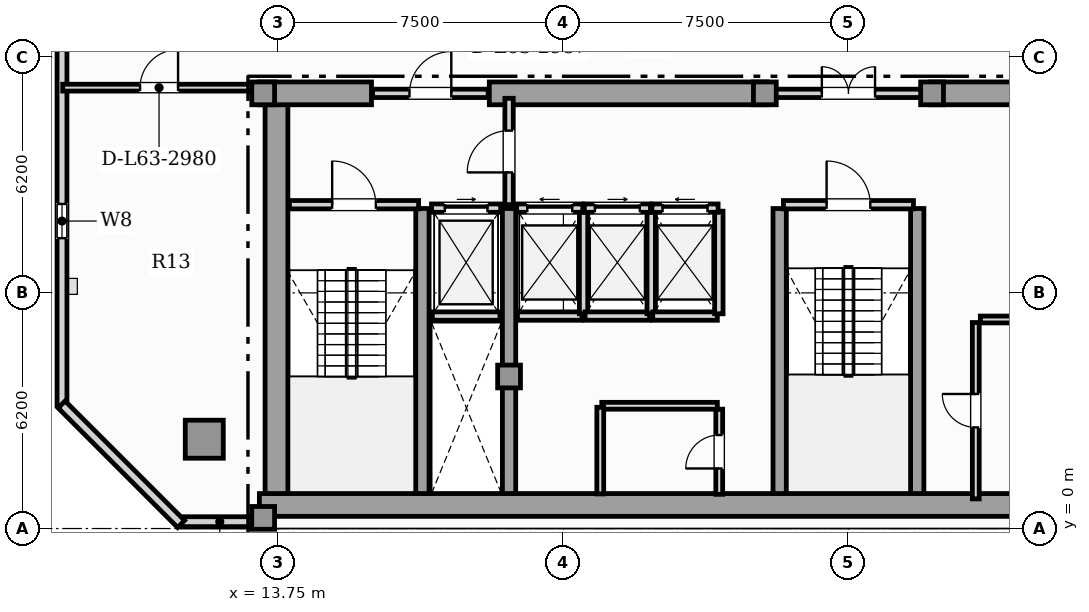
"""IFC4 building model, lengths in metres.
Left out: names, types, materials, properties, quantities, classifications, styles, units other than length and angle.
Written with IfcOpenShell. Run it as: python <this file> out.ifc"""

import sys

from ifc_helpers import new_model, si_unit, direction, frame, frame_2d, origin, origin_2d, place, context, subcontext, project, spatial, rectangle, hollow_rectangle, extrude, element, fill, save


model = new_model("IFC4")
c1 = context("Model", 3, precision=1e-05, world=origin(), true_north=direction((0.0, 1.0)))
c2 = subcontext(c1, "Body", "Model", "MODEL_VIEW")
j1 = project(units=[si_unit("LENGTHUNIT", "METRE"), si_unit("PLANEANGLEUNIT", "RADIAN")], contexts=[c1])
p1 = place(None, origin())
s1 = spatial("IfcSite", under=j1, at=p1, CompositionType="ELEMENT")
p2 = place(p1, origin())
s2 = spatial("IfcBuilding", under=s1, at=p2, CompositionType="ELEMENT")
p3 = place(p2, frame((0.0, 0.0, 256.75)))
s3 = spatial("IfcBuildingStorey", under=s2, at=p3, CompositionType="ELEMENT", Elevation=256.75)
p4 = place(p3, frame((13.25, 0.62, 0.0), z_axis=(0.0, 0.0, 1.0), x_axis=(1.0, 0.0, 0.0)))
e1 = element("IfcWall", 1, at=p4, inside=s3, PredefinedType="SHEAR", context=c2, shape_type="SweptSolid", body=[
    extrude(rectangle(XDim=31.0, YDim=0.6, at=frame_2d((15.5, 0.0))), origin(), (0.0, 0.0, 1.0), 3.65),
])
p5 = place(p3, frame((13.7, 0.92, 0.0), z_axis=(0.0, 0.0, 1.0), x_axis=(0.0, 1.0, 0.0)))
e2 = element("IfcWall", 2, at=p5, inside=s3, PredefinedType="SHEAR", context=c2, shape_type="SweptSolid", body=[
    extrude(rectangle(XDim=10.53, YDim=0.6, at=frame_2d((5.265, 0.0))), origin(), (0.0, 0.0, 1.0), 3.65),
])
p6 = place(p3, frame((13.25, 11.45, 0.0), z_axis=(0.0, 0.0, 1.0), x_axis=(1.0, 0.0, 0.0)))
e3 = element("IfcWall", 3, at=p6, inside=s3, PredefinedType="SHEAR", context=c2, shape_type="SweptSolid", body=[
    extrude(rectangle(XDim=2.95, YDim=0.6, at=frame_2d((1.475, 0.0))), origin(), (0.0, 0.0, 1.0), 3.65),
])
for number, where, z_axis, x_axis in (
    (4, (19.3, 11.45, 0.0), (0.0, 0.0, 1.0), (1.0, 0.0, 0.0)),
    (5, (30.9, 11.45, 0.0), (0.0, 0.0, 1.0), (1.0, 0.0, 0.0)),
):
    element("IfcWall", number, at=place(p3, frame(where, z_axis=z_axis, x_axis=x_axis)), inside=s3, PredefinedType="SHEAR", context=c2, shape_type="SweptSolid", body=[
        extrude(rectangle(XDim=7.3, YDim=0.6, at=frame_2d((3.65, 0.0))), origin(), (0.0, 0.0, 1.0), 3.65),
    ])
for number, where, z_axis, x_axis in (
    (6, (17.54, 0.92, 0.0), (0.0, 0.0, 1.0), (0.0, 1.0, 0.0)),
    (7, (19.82, 0.92, 0.0), (0.0, 0.0, 1.0), (0.0, 1.0, 0.0)),
    (8, (26.94, 0.92, 0.0), (0.0, 0.0, 1.0), (0.0, 1.0, 0.0)),
    (9, (30.56, 0.92, 0.0), (0.0, 0.0, 1.0), (0.0, 1.0, 0.0)),
):
    element("IfcWall", number, at=place(p3, frame(where, z_axis=z_axis, x_axis=x_axis)), inside=s3, PredefinedType="SHEAR", context=c2, shape_type="SweptSolid", body=[
        extrude(rectangle(XDim=7.5, YDim=0.35, at=frame_2d((3.75, 0.0))), origin(), (0.0, 0.0, 1.0), 3.65),
    ])
for number, where, z_axis, x_axis in (
    (10, (13.35, 0.28, 0.0), (0.0, 0.0, 1.0), (1.0, 0.0, 0.0)),
    (11, (13.35, 11.45, 0.0), (0.0, 0.0, 1.0), (1.0, 0.0, 0.0)),
    (12, (19.82, 4.0, 0.0), (0.0, 0.0, 1.0), (1.0, 0.0, 0.0)),
    (13, (26.55, 11.45, 0.0), (0.0, 0.0, 1.0), (1.0, 0.0, 0.0)),
    (14, (30.95, 11.45, 0.0), (0.0, 0.0, 1.0), (1.0, 0.0, 0.0)),
):
    element("IfcColumn", number, at=place(p3, frame(where, z_axis=z_axis, x_axis=x_axis)), inside=s3, PredefinedType="COLUMN", context=c2, shape_type="SweptSolid", body=[
        extrude(rectangle(XDim=0.6, YDim=0.6, at=origin_2d()), origin(), (0.0, 0.0, 1.0), 3.85),
    ])
p7 = place(p3, frame((11.8, 2.35, 0.0), z_axis=(0.0, 0.0, 1.0), x_axis=(1.0, 0.0, 0.0)))
e15 = element("IfcColumn", 15, at=p7, inside=s3, PredefinedType="USERDEFINED", context=c2, shape_type="SweptSolid", body=[
    extrude(hollow_rectangle(XDim=1.0, YDim=1.0, WallThickness=0.06, at=origin_2d()), origin(), (0.0, 0.0, 1.0), 3.85),
])
p8 = place(p3, frame((11.167, 0.18, 0.0), z_axis=(0.0, 0.0, 1.0), x_axis=(1.0, 0.0, 0.0)))
e16 = element("IfcWall", 16, at=p8, inside=s3, PredefinedType="SOLIDWALL", context=c2, shape_type="SweptSolid", body=[
    extrude(rectangle(XDim=2.083, YDim=0.26, at=frame_2d((1.042, 0.0))), origin(), (0.0, 0.0, 1.0), 3.65),
])
p9 = place(p3, frame((8.057, 32.726, 0.0), z_axis=(0.0, 0.0, 1.0), x_axis=(0.0, -1.0, 0.0)))
e17 = element("IfcWall", 17, at=p9, inside=s3, PredefinedType="SOLIDWALL", context=c2, shape_type="SweptSolid", body=[
    extrude(rectangle(XDim=29.486, YDim=0.26, at=frame_2d((14.743, 0.0))), origin(), (0.0, 0.0, 1.0), 3.19),
])
p10 = place(p9, frame((24.186, 0.0, 0.85)))
e18 = element("IfcOpeningElement", 18, at=p10, cuts=e17, PredefinedType="OPENING", context=c2, shape_type="SweptSolid", body=[
    extrude(rectangle(XDim=0.9, YDim=1.4, at=frame_2d((0.45, 0.7))), frame((0.0, 0.14, 0.0), z_axis=(0.0, -1.0, 0.0), x_axis=(1.0, 0.0, 0.0)), (0.0, 0.0, 1.0), 0.28),
])
p11 = place(p9, frame((4.526, 0.0, 0.85)))
e19 = element("IfcOpeningElement", 19, at=p11, cuts=e17, PredefinedType="OPENING", context=c2, shape_type="SweptSolid", body=[
    extrude(rectangle(XDim=0.9, YDim=1.4, at=frame_2d((0.45, 0.7))), frame((0.0, 0.14, 0.0), z_axis=(0.0, -1.0, 0.0), x_axis=(1.0, 0.0, 0.0)), (0.0, 0.0, 1.0), 0.28),
])
p12 = place(p9, frame((15.108, 0.0, 0.85)))
e20 = element("IfcOpeningElement", 20, at=p12, cuts=e17, PredefinedType="OPENING", context=c2, shape_type="SweptSolid", body=[
    extrude(rectangle(XDim=0.9, YDim=1.4, at=frame_2d((0.45, 0.7))), frame((0.0, 0.14, 0.0), z_axis=(0.0, -1.0, 0.0), x_axis=(1.0, 0.0, 0.0)), (0.0, 0.0, 1.0), 0.28),
])
p13 = place(p9, frame((9.501, 0.0, 0.85)))
e21 = element("IfcOpeningElement", 21, at=p13, cuts=e17, PredefinedType="OPENING", context=c2, shape_type="SweptSolid", body=[
    extrude(rectangle(XDim=0.9, YDim=1.4, at=frame_2d((0.45, 0.7))), frame((0.0, 0.14, 0.0), z_axis=(0.0, -1.0, 0.0), x_axis=(1.0, 0.0, 0.0)), (0.0, 0.0, 1.0), 0.28),
])
p14 = place(p3, frame((8.047, 3.264, 0.0), z_axis=(0.0, 0.0, 1.0), x_axis=(0.707079321262, -0.707134240044, 0.0)))
e22 = element("IfcWall", 22, at=p14, inside=s3, PredefinedType="SOLIDWALL", context=c2, shape_type="SweptSolid", body=[
    extrude(rectangle(XDim=4.446, YDim=0.26, at=frame_2d((2.223, 0.0))), origin(), (0.0, 0.0, 1.0), 3.65),
])
p15 = place(p3, frame((17.8, 5.59, 0.0), z_axis=(0.0, 0.0, 1.0), x_axis=(1.0, 0.0, 0.0)))
e23 = element("IfcWall", 23, at=p15, inside=s3, PredefinedType="SOLIDWALL", context=c2, shape_type="SweptSolid", body=[
    extrude(rectangle(XDim=1.78, YDim=0.22, at=frame_2d((0.89, 0.0))), origin(), (0.0, 0.0, 1.0), 3.65),
])
p16 = place(p3, frame((17.78, 8.43, 0.0), z_axis=(0.0, 0.0, 1.0), x_axis=(1.0, 0.0, 0.0)))
e24 = element("IfcWall", 24, at=p16, inside=s3, PredefinedType="SOLIDWALL", context=c2, shape_type="SweptSolid", body=[
    extrude(rectangle(XDim=1.82, YDim=0.22, at=frame_2d((0.91, 0.0))), origin(), (0.0, 0.0, 1.0), 3.65),
])
p17 = place(p16, frame((0.35, 0.0, 0.0)))
e25 = element("IfcOpeningElement", 25, at=p17, cuts=e24, PredefinedType="OPENING", context=c2, shape_type="SweptSolid", body=[
    extrude(rectangle(XDim=1.12, YDim=2.25, at=frame_2d((0.56, 1.125))), frame((0.0, 0.12, 0.0), z_axis=(0.0, -1.0, 0.0), x_axis=(1.0, 0.0, 0.0)), (0.0, 0.0, 1.0), 0.24),
])
p18 = place(p3, frame((20.04, 5.59, 0.0), z_axis=(0.0, 0.0, 1.0), x_axis=(1.0, 0.0, 0.0)))
e26 = element("IfcWall", 26, at=p18, inside=s3, PredefinedType="SOLIDWALL", context=c2, shape_type="SweptSolid", body=[
    extrude(rectangle(XDim=1.7, YDim=0.22, at=frame_2d((0.85, 0.0))), origin(), (0.0, 0.0, 1.0), 3.65),
])
p19 = place(p3, frame((21.78, 5.65, 0.0), z_axis=(0.0, 0.0, 1.0), x_axis=(0.0, 1.0, 0.0)))
e27 = element("IfcWall", 27, at=p19, inside=s3, PredefinedType="SOLIDWALL", context=c2, shape_type="SweptSolid", body=[
    extrude(rectangle(XDim=2.7, YDim=0.22, at=frame_2d((1.35, 0.0))), origin(), (0.0, 0.0, 1.0), 3.65),
])
p20 = place(p3, frame((20.02, 8.43, 0.0), z_axis=(0.0, 0.0, 1.0), x_axis=(1.0, 0.0, 0.0)))
e28 = element("IfcWall", 28, at=p20, inside=s3, PredefinedType="SOLIDWALL", context=c2, shape_type="SweptSolid", body=[
    extrude(rectangle(XDim=1.74, YDim=0.22, at=frame_2d((0.87, 0.0))), origin(), (0.0, 0.0, 1.0), 3.65),
])
p21 = place(p20, frame((0.28, 0.0, 0.0)))
e29 = element("IfcOpeningElement", 29, at=p21, cuts=e28, PredefinedType="OPENING", context=c2, shape_type="SweptSolid", body=[
    extrude(rectangle(XDim=1.18, YDim=2.2, at=frame_2d((0.59, 1.1))), frame((0.0, 0.12, 0.0), z_axis=(0.0, -1.0, 0.0), x_axis=(1.0, 0.0, 0.0)), (0.0, 0.0, 1.0), 0.24),
])
p22 = place(p3, frame((21.82, 5.59, 0.0), z_axis=(0.0, 0.0, 1.0), x_axis=(1.0, 0.0, 0.0)))
e30 = element("IfcWall", 30, at=p22, inside=s3, PredefinedType="SOLIDWALL", context=c2, shape_type="SweptSolid", body=[
    extrude(rectangle(XDim=1.7, YDim=0.22, at=frame_2d((0.85, 0.0))), origin(), (0.0, 0.0, 1.0), 3.65),
])
p23 = place(p3, frame((23.56, 5.65, 0.0), z_axis=(0.0, 0.0, 1.0), x_axis=(0.0, 1.0, 0.0)))
e31 = element("IfcWall", 31, at=p23, inside=s3, PredefinedType="SOLIDWALL", context=c2, shape_type="SweptSolid", body=[
    extrude(rectangle(XDim=2.7, YDim=0.22, at=frame_2d((1.35, 0.0))), origin(), (0.0, 0.0, 1.0), 3.65),
])
p24 = place(p3, frame((21.8, 8.43, 0.0), z_axis=(0.0, 0.0, 1.0), x_axis=(1.0, 0.0, 0.0)))
e32 = element("IfcWall", 32, at=p24, inside=s3, PredefinedType="SOLIDWALL", context=c2, shape_type="SweptSolid", body=[
    extrude(rectangle(XDim=1.74, YDim=0.22, at=frame_2d((0.87, 0.0))), origin(), (0.0, 0.0, 1.0), 3.65),
])
p25 = place(p24, frame((0.28, 0.0, 0.0)))
e33 = element("IfcOpeningElement", 33, at=p25, cuts=e32, PredefinedType="OPENING", context=c2, shape_type="SweptSolid", body=[
    extrude(rectangle(XDim=1.18, YDim=2.2, at=frame_2d((0.59, 1.1))), frame((0.0, 0.12, 0.0), z_axis=(0.0, -1.0, 0.0), x_axis=(1.0, 0.0, 0.0)), (0.0, 0.0, 1.0), 0.24),
])
p26 = place(p3, frame((23.6, 5.59, 0.0), z_axis=(0.0, 0.0, 1.0), x_axis=(1.0, 0.0, 0.0)))
e34 = element("IfcWall", 34, at=p26, inside=s3, PredefinedType="SOLIDWALL", context=c2, shape_type="SweptSolid", body=[
    extrude(rectangle(XDim=1.7, YDim=0.22, at=frame_2d((0.85, 0.0))), origin(), (0.0, 0.0, 1.0), 3.65),
])
p27 = place(p3, frame((25.34, 5.65, 0.0), z_axis=(0.0, 0.0, 1.0), x_axis=(0.0, 1.0, 0.0)))
e35 = element("IfcWall", 35, at=p27, inside=s3, PredefinedType="SOLIDWALL", context=c2, shape_type="SweptSolid", body=[
    extrude(rectangle(XDim=2.7, YDim=0.22, at=frame_2d((1.35, 0.0))), origin(), (0.0, 0.0, 1.0), 3.65),
])
p28 = place(p3, frame((23.58, 8.43, 0.0), z_axis=(0.0, 0.0, 1.0), x_axis=(1.0, 0.0, 0.0)))
e36 = element("IfcWall", 36, at=p28, inside=s3, PredefinedType="SOLIDWALL", context=c2, shape_type="SweptSolid", body=[
    extrude(rectangle(XDim=1.74, YDim=0.22, at=frame_2d((0.87, 0.0))), origin(), (0.0, 0.0, 1.0), 3.65),
])
p29 = place(p28, frame((0.28, 0.0, 0.0)))
e37 = element("IfcOpeningElement", 37, at=p29, cuts=e36, PredefinedType="OPENING", context=c2, shape_type="SweptSolid", body=[
    extrude(rectangle(XDim=1.18, YDim=2.2, at=frame_2d((0.59, 1.1))), frame((0.0, 0.12, 0.0), z_axis=(0.0, -1.0, 0.0), x_axis=(1.0, 0.0, 0.0)), (0.0, 0.0, 1.0), 0.24),
])
p30 = place(p3, frame((14.04, 8.52, 0.0), z_axis=(0.0, 0.0, 1.0), x_axis=(1.0, 0.0, 0.0)))
e38 = element("IfcWall", 38, at=p30, inside=s3, PredefinedType="SOLIDWALL", context=c2, shape_type="SweptSolid", body=[
    extrude(rectangle(XDim=3.4, YDim=0.22, at=frame_2d((1.7, 0.0))), origin(), (0.0, 0.0, 1.0), 3.65),
])
p31 = place(p30, frame((1.125, 0.0, 0.0)))
e39 = element("IfcOpeningElement", 39, at=p31, cuts=e38, PredefinedType="OPENING", context=c2, shape_type="SweptSolid", body=[
    extrude(rectangle(XDim=1.15, YDim=2.2, at=frame_2d((0.575, 1.1))), frame((0.0, 0.12, 0.0), z_axis=(0.0, -1.0, 0.0), x_axis=(1.0, 0.0, 0.0)), (0.0, 0.0, 1.0), 0.24),
])
p32 = place(p3, frame((27.04, 8.52, 0.0), z_axis=(0.0, 0.0, 1.0), x_axis=(1.0, 0.0, 0.0)))
e40 = element("IfcWall", 40, at=p32, inside=s3, PredefinedType="SOLIDWALL", context=c2, shape_type="SweptSolid", body=[
    extrude(rectangle(XDim=3.42, YDim=0.22, at=frame_2d((1.71, 0.0))), origin(), (0.0, 0.0, 1.0), 3.65),
])
p33 = place(p32, frame((1.135, 0.0, 0.0)))
e41 = element("IfcOpeningElement", 41, at=p33, cuts=e40, PredefinedType="OPENING", context=c2, shape_type="SweptSolid", body=[
    extrude(rectangle(XDim=1.15, YDim=2.2, at=frame_2d((0.575, 1.1))), frame((0.0, 0.12, 0.0), z_axis=(0.0, -1.0, 0.0), x_axis=(1.0, 0.0, 0.0)), (0.0, 0.0, 1.0), 0.24),
])
p34 = place(p3, frame((19.82, 8.52, 0.0), z_axis=(0.0, 0.0, 1.0), x_axis=(0.0, 1.0, 0.0)))
e42 = element("IfcWall", 42, at=p34, inside=s3, PredefinedType="SOLIDWALL", context=c2, shape_type="SweptSolid", body=[
    extrude(rectangle(XDim=2.8, YDim=0.22, at=frame_2d((1.4, 0.0))), origin(), (0.0, 0.0, 1.0), 3.105),
])
p35 = place(p34, frame((0.85, 0.0, 0.0)))
e43 = element("IfcOpeningElement", 43, at=p35, cuts=e42, PredefinedType="OPENING", context=c2, shape_type="SweptSolid", body=[
    extrude(rectangle(XDim=1.1, YDim=2.2, at=frame_2d((0.55, 1.1))), frame((0.0, 0.12, 0.0), z_axis=(0.0, -1.0, 0.0), x_axis=(1.0, 0.0, 0.0)), (0.0, 0.0, 1.0), 0.24),
])
p36 = place(p3, frame((16.23, 11.45, 0.0), z_axis=(0.0, 0.0, 1.0), x_axis=(1.0, 0.0, 0.0)))
e44 = element("IfcWall", 44, at=p36, inside=s3, PredefinedType="SOLIDWALL", context=c2, shape_type="SweptSolid", body=[
    extrude(rectangle(XDim=3.04, YDim=0.22, at=frame_2d((1.52, 0.0))), origin(), (0.0, 0.0, 1.0), 3.65),
])
p37 = place(p36, frame((0.97, 0.0, 0.0)))
e45 = element("IfcOpeningElement", 45, at=p37, cuts=e44, PredefinedType="OPENING", context=c2, shape_type="SweptSolid", body=[
    extrude(rectangle(XDim=1.1, YDim=2.2, at=frame_2d((0.55, 1.1))), frame((0.0, 0.12, 0.0), z_axis=(0.0, -1.0, 0.0), x_axis=(1.0, 0.0, 0.0)), (0.0, 0.0, 1.0), 0.24),
])
p38 = place(p3, frame((26.63, 11.45, 0.0), z_axis=(0.0, 0.0, 1.0), x_axis=(1.0, 0.0, 0.0)))
e46 = element("IfcWall", 46, at=p38, inside=s3, PredefinedType="SOLIDWALL", context=c2, shape_type="SweptSolid", body=[
    extrude(rectangle(XDim=4.24, YDim=0.22, at=frame_2d((2.12, 0.0))), origin(), (0.0, 0.0, 1.0), 3.65),
])
p39 = place(p38, frame((1.42, 0.0, 0.0)))
e47 = element("IfcOpeningElement", 47, at=p39, cuts=e46, PredefinedType="OPENING", context=c2, shape_type="SweptSolid", body=[
    extrude(rectangle(XDim=1.4, YDim=2.2, at=frame_2d((0.7, 1.1))), frame((0.0, 0.12, 0.0), z_axis=(0.0, -1.0, 0.0), x_axis=(1.0, 0.0, 0.0)), (0.0, 0.0, 1.0), 0.24),
])
p40 = place(p3, frame((25.35, 0.9, 0.0), z_axis=(0.0, 0.0, 1.0), x_axis=(0.0, 1.0, 0.0)))
e48 = element("IfcWall", 48, at=p40, inside=s3, PredefinedType="PARTITIONING", context=c2, shape_type="SweptSolid", body=[
    extrude(rectangle(XDim=2.24, YDim=0.18, at=frame_2d((1.12, 0.0))), origin(), (0.0, 0.0, 1.0), 3.65),
])
p41 = place(p40, frame((0.68, 0.0, 0.0)))
e49 = element("IfcOpeningElement", 49, at=p41, cuts=e48, PredefinedType="OPENING", context=c2, shape_type="SweptSolid", body=[
    extrude(rectangle(XDim=0.88, YDim=2.05, at=frame_2d((0.44, 1.025))), frame((0.0, 0.1, 0.0), z_axis=(0.0, -1.0, 0.0), x_axis=(1.0, 0.0, 0.0)), (0.0, 0.0, 1.0), 0.2),
])
p42 = place(p3, frame((22.26, 3.23, 0.0), z_axis=(0.0, 0.0, 1.0), x_axis=(1.0, 0.0, 0.0)))
e50 = element("IfcWall", 50, at=p42, inside=s3, PredefinedType="PARTITIONING", context=c2, shape_type="SweptSolid", body=[
    extrude(rectangle(XDim=3.04, YDim=0.18, at=frame_2d((1.52, 0.0))), origin(), (0.0, 0.0, 1.0), 3.65),
])
p43 = place(p3, frame((22.22, 0.91, 0.0), z_axis=(0.0, 0.0, 1.0), x_axis=(0.0, 1.0, 0.0)))
e51 = element("IfcWall", 51, at=p43, inside=s3, PredefinedType="PARTITIONING", context=c2, shape_type="SweptSolid", body=[
    extrude(rectangle(XDim=2.28, YDim=0.18, at=frame_2d((1.14, 0.0))), origin(), (0.0, 0.0, 1.0), 3.65),
])
p44 = place(p3, frame((32.1, 0.78, 0.0), z_axis=(0.0, 0.0, 1.0), x_axis=(0.0, 1.0, 0.0)))
e52 = element("IfcWall", 52, at=p44, inside=s3, PredefinedType="PARTITIONING", context=c2, shape_type="SweptSolid", body=[
    extrude(rectangle(XDim=4.64, YDim=0.18, at=frame_2d((2.32, 0.0))), origin(), (0.0, 0.0, 1.0), 3.65),
])
p45 = place(p44, frame((1.88, 0.0, 0.0)))
e53 = element("IfcOpeningElement", 53, at=p45, cuts=e52, PredefinedType="OPENING", context=c2, shape_type="SweptSolid", body=[
    extrude(rectangle(XDim=0.88, YDim=2.05, at=frame_2d((0.44, 1.025))), frame((0.0, 0.1, 0.0), z_axis=(0.0, -1.0, 0.0), x_axis=(1.0, 0.0, 0.0)), (0.0, 0.0, 1.0), 0.2),
])
p46 = place(p3, frame((32.22, 5.5, 0.0), z_axis=(0.0, 0.0, 1.0), x_axis=(1.0, 0.0, 0.0)))
e54 = element("IfcWall", 54, at=p46, inside=s3, PredefinedType="PARTITIONING", context=c2, shape_type="SweptSolid", body=[
    extrude(rectangle(XDim=2.9, YDim=0.18, at=frame_2d((1.45, 0.0))), origin(), (0.0, 0.0, 1.0), 3.65),
])
p47 = place(p3, frame((8.076, 11.6, 0.0), z_axis=(0.0, 0.0, 1.0), x_axis=(1.0, 0.0, 0.0)))
e55 = element("IfcWall", 55, at=p47, inside=s3, PredefinedType="PARTITIONING", context=c2, shape_type="SweptSolid", body=[
    extrude(rectangle(XDim=5.069, YDim=0.18, at=frame_2d((2.534, 0.0))), origin(), (0.0, 0.0, 1.0), 3.65),
])
p48 = place(p47, frame((2.034, 0.0, 0.0)))
e56 = element("IfcOpeningElement", 56, at=p48, cuts=e55, PredefinedType="OPENING", context=c2, shape_type="SweptSolid", body=[
    extrude(rectangle(XDim=1.0, YDim=2.15, at=frame_2d((0.5, 1.075))), frame((0.0, 0.1, 0.0), z_axis=(0.0, -1.0, 0.0), x_axis=(1.0, 0.0, 0.0)), (0.0, 0.0, 1.0), 0.2),
])
p49 = place(p10, origin())
e57 = element("IfcWindow", 57, at=p49, inside=s3, PartitioningType="SINGLE_PANEL", PredefinedType="WINDOW", context=c2, shape_type="SweptSolid", body=[
    extrude(rectangle(XDim=0.9, YDim=1.4, at=frame_2d((0.45, 0.7))), frame((0.0, 0.03, 0.0), z_axis=(0.0, -1.0, 0.0), x_axis=(1.0, 0.0, 0.0)), (0.0, 0.0, 1.0), 0.06),
])
fill(e18, e57)
p50 = place(p17, origin())
e58 = element("IfcDoor", 58, at=p50, inside=s3, OperationType="SLIDING_TO_RIGHT", PredefinedType="DOOR", context=c2, shape_type="SweptSolid", body=[
    extrude(rectangle(XDim=1.12, YDim=2.25, at=frame_2d((0.56, 1.125))), frame((0.0, 0.025, 0.0), z_axis=(0.0, -1.0, 0.0), x_axis=(1.0, 0.0, 0.0)), (0.0, 0.0, 1.0), 0.05),
])
fill(e25, e58)
p51 = place(p21, origin())
e59 = element("IfcDoor", 59, at=p51, inside=s3, OperationType="SLIDING_TO_LEFT", PredefinedType="DOOR", context=c2, shape_type="SweptSolid", body=[
    extrude(rectangle(XDim=1.18, YDim=2.2, at=frame_2d((0.59, 1.1))), frame((0.0, 0.025, 0.0), z_axis=(0.0, -1.0, 0.0), x_axis=(1.0, 0.0, 0.0)), (0.0, 0.0, 1.0), 0.05),
])
fill(e29, e59)
p52 = place(p25, origin())
e60 = element("IfcDoor", 60, at=p52, inside=s3, OperationType="SLIDING_TO_RIGHT", PredefinedType="DOOR", context=c2, shape_type="SweptSolid", body=[
    extrude(rectangle(XDim=1.18, YDim=2.2, at=frame_2d((0.59, 1.1))), frame((0.0, 0.025, 0.0), z_axis=(0.0, -1.0, 0.0), x_axis=(1.0, 0.0, 0.0)), (0.0, 0.0, 1.0), 0.05),
])
fill(e33, e60)
p53 = place(p29, origin())
e61 = element("IfcDoor", 61, at=p53, inside=s3, OperationType="SLIDING_TO_LEFT", PredefinedType="DOOR", context=c2, shape_type="SweptSolid", body=[
    extrude(rectangle(XDim=1.18, YDim=2.2, at=frame_2d((0.59, 1.1))), frame((0.0, 0.025, 0.0), z_axis=(0.0, -1.0, 0.0), x_axis=(1.0, 0.0, 0.0)), (0.0, 0.0, 1.0), 0.05),
])
fill(e37, e61)
p54 = place(p31, origin())
e62 = element("IfcDoor", 62, at=p54, inside=s3, OperationType="SINGLE_SWING_LEFT", PredefinedType="DOOR", context=c2, shape_type="SweptSolid", body=[
    extrude(rectangle(XDim=1.15, YDim=2.2, at=frame_2d((0.575, 1.1))), frame((0.0, 0.025, 0.0), z_axis=(0.0, -1.0, 0.0), x_axis=(1.0, 0.0, 0.0)), (0.0, 0.0, 1.0), 0.05),
])
fill(e39, e62)
p55 = place(p33, origin())
e63 = element("IfcDoor", 63, at=p55, inside=s3, OperationType="SINGLE_SWING_LEFT", PredefinedType="DOOR", context=c2, shape_type="SweptSolid", body=[
    extrude(rectangle(XDim=1.15, YDim=2.2, at=frame_2d((0.575, 1.1))), frame((0.0, 0.025, 0.0), z_axis=(0.0, -1.0, 0.0), x_axis=(1.0, 0.0, 0.0)), (0.0, 0.0, 1.0), 0.05),
])
fill(e41, e63)
p56 = place(p35, origin())
e64 = element("IfcDoor", 64, at=p56, inside=s3, OperationType="SINGLE_SWING_LEFT", PredefinedType="DOOR", context=c2, shape_type="SweptSolid", body=[
    extrude(rectangle(XDim=1.1, YDim=2.2, at=frame_2d((0.55, 1.1))), frame((0.0, 0.025, 0.0), z_axis=(0.0, -1.0, 0.0), x_axis=(1.0, 0.0, 0.0)), (0.0, 0.0, 1.0), 0.05),
])
fill(e43, e64)
p57 = place(p37, origin())
e65 = element("IfcDoor", 65, at=p57, inside=s3, OperationType="SINGLE_SWING_RIGHT", PredefinedType="DOOR", context=c2, shape_type="SweptSolid", body=[
    extrude(rectangle(XDim=1.1, YDim=2.2, at=frame_2d((0.55, 1.1))), frame((0.0, 0.025, 0.0), z_axis=(0.0, -1.0, 0.0), x_axis=(1.0, 0.0, 0.0)), (0.0, 0.0, 1.0), 0.05),
])
fill(e45, e65)
p58 = place(p39, origin())
e66 = element("IfcDoor", 66, at=p58, inside=s3, OperationType="DOUBLE_DOOR_SINGLE_SWING", PredefinedType="DOOR", context=c2, shape_type="SweptSolid", body=[
    extrude(rectangle(XDim=1.4, YDim=2.2, at=frame_2d((0.7, 1.1))), frame((0.0, 0.025, 0.0), z_axis=(0.0, -1.0, 0.0), x_axis=(1.0, 0.0, 0.0)), (0.0, 0.0, 1.0), 0.05),
])
fill(e47, e66)
p59 = place(p41, origin())
e67 = element("IfcDoor", 67, at=p59, inside=s3, OperationType="SINGLE_SWING_LEFT", PredefinedType="DOOR", context=c2, shape_type="SweptSolid", body=[
    extrude(rectangle(XDim=0.88, YDim=2.05, at=frame_2d((0.44, 1.025))), frame((0.0, 0.025, 0.0), z_axis=(0.0, -1.0, 0.0), x_axis=(1.0, 0.0, 0.0)), (0.0, 0.0, 1.0), 0.05),
])
fill(e49, e67)
p60 = place(p45, origin())
e68 = element("IfcDoor", 68, at=p60, inside=s3, OperationType="SINGLE_SWING_RIGHT", PredefinedType="DOOR", context=c2, shape_type="SweptSolid", body=[
    extrude(rectangle(XDim=0.88, YDim=2.05, at=frame_2d((0.44, 1.025))), frame((0.0, 0.025, 0.0), z_axis=(0.0, -1.0, 0.0), x_axis=(1.0, 0.0, 0.0)), (0.0, 0.0, 1.0), 0.05),
])
fill(e53, e68)
p61 = place(p48, origin())
e69 = element("IfcDoor", 69, at=p61, inside=s3, OperationType="SINGLE_SWING_RIGHT", PredefinedType="DOOR", context=c2, shape_type="SweptSolid", body=[
    extrude(rectangle(XDim=1.0, YDim=2.15, at=frame_2d((0.5, 1.075))), frame((0.0, 0.025, 0.0), z_axis=(0.0, -1.0, 0.0), x_axis=(1.0, 0.0, 0.0)), (0.0, 0.0, 1.0), 0.05),
])
fill(e56, e69)
save(model, sys.argv[1])
